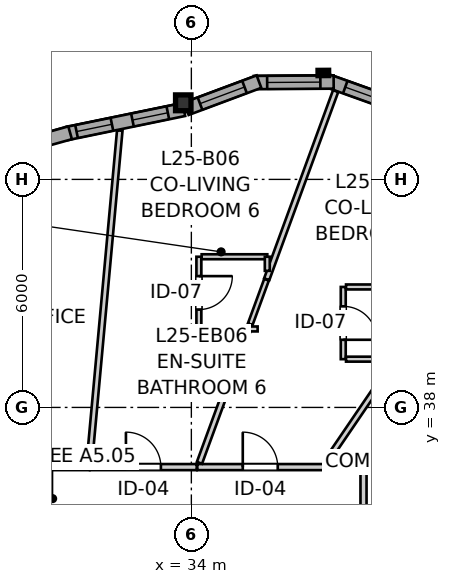
"""IFC4 building model, lengths in metres.
Left out: names, types, materials, properties, quantities, classifications, styles, units other than length and angle.
Written with IfcOpenShell. Run it as: python <this file> out.ifc"""

import sys

from ifc_helpers import new_model, si_unit, direction, frame, frame_2d, origin, origin_2d, place, context, subcontext, project, spatial, rectangle, i_section, extrude, source, transform, mapped, element, fill, save


model = new_model("IFC4")
c1 = context("Model", 3, precision=1e-05, world=origin(), true_north=direction((0.0, 1.0)))
c2 = subcontext(c1, "Body", "Model", "MODEL_VIEW")
j1 = project(units=[si_unit("LENGTHUNIT", "METRE"), si_unit("PLANEANGLEUNIT", "RADIAN")], contexts=[c1])
p1 = place(None, origin())
s1 = spatial("IfcSite", under=j1, at=p1, CompositionType="ELEMENT")
p2 = place(p1, origin())
s2 = spatial("IfcBuilding", under=s1, at=p2, CompositionType="ELEMENT")
p3 = place(p2, frame((0.0, 0.0, 86.4)))
s3 = spatial("IfcBuildingStorey", under=s2, at=p3, CompositionType="ELEMENT", Elevation=86.4)
m1 = source(origin(), c2, "Body", "SweptSolid", [
    extrude(i_section(OverallWidth=0.406, OverallDepth=0.416, WebThickness=0.027, FlangeThickness=0.044, FilletRadius=0.015, at=origin_2d()), origin(), (0.0, 0.0, 1.0), 2.95),
])
p4 = place(p3, frame((33.787, 46.015, 0.0), z_axis=(0.0, 0.0, 1.0), x_axis=(1.0, 0.0, 0.0)))
e1 = element("IfcColumn", 1, at=p4, inside=s3, PredefinedType="PILASTER", context=c2, shape_type="MappedRepresentation", body=[
    mapped(m1, transform((0.0, 0.0, 0.0), x_axis=(1.0, 0.0, 0.0), y_axis=(0.0, 1.0, 0.0), z_axis=(0.0, 0.0, 1.0), scale=1.0)),
])
p5 = place(p3, frame((39.586, 45.877, 0.0), z_axis=(0.0, 0.0, 1.0), x_axis=(-0.941473186867, 0.33708787936, 0.0)))
e2 = element("IfcWall", 2, at=p5, inside=s3, PredefinedType="SOLIDWALL", context=c2, shape_type="SweptSolid", body=[
    extrude(rectangle(XDim=2.099, YDim=0.35, at=frame_2d((1.049, 0.0))), origin(), (0.0, 0.0, 1.0), 2.48),
])
p6 = place(p5, frame((0.283, 0.0, 0.82)))
e3 = element("IfcOpeningElement", 3, at=p6, cuts=e2, PredefinedType="OPENING", context=c2, shape_type="SweptSolid", body=[
    extrude(rectangle(XDim=1.35, YDim=1.45, at=frame_2d((0.675, 0.725))), frame((0.0, 0.185, 0.0), z_axis=(0.0, -1.0, 0.0), x_axis=(1.0, 0.0, 0.0)), (0.0, 0.0, 1.0), 0.37),
])
p7 = place(p3, frame((37.744, 46.562, 0.0), z_axis=(0.0, 0.0, 1.0), x_axis=(-0.999976451414, -0.006862697526, 0.0)))
e4 = element("IfcWall", 4, at=p7, inside=s3, PredefinedType="SOLIDWALL", context=c2, shape_type="SweptSolid", body=[
    extrude(rectangle(XDim=2.099, YDim=0.35, at=frame_2d((1.049, 0.0))), origin(), (0.0, 0.0, 1.0), 2.48),
])
p8 = place(p7, frame((0.35, 0.0, 0.82)))
e5 = element("IfcOpeningElement", 5, at=p8, cuts=e4, PredefinedType="OPENING", context=c2, shape_type="SweptSolid", body=[
    extrude(rectangle(XDim=1.4, YDim=1.35, at=frame_2d((0.7, 0.675))), frame((0.0, 0.185, 0.0), z_axis=(0.0, -1.0, 0.0), x_axis=(1.0, 0.0, 0.0)), (0.0, 0.0, 1.0), 0.37),
])
p9 = place(p3, frame((35.779, 46.573, 0.0), z_axis=(0.0, 0.0, 1.0), x_axis=(-0.9368002254, -0.349864741994, 0.0)))
e6 = element("IfcWall", 6, at=p9, inside=s3, PredefinedType="SOLIDWALL", context=c2, shape_type="SweptSolid", body=[
    extrude(rectangle(XDim=2.041, YDim=0.35, at=frame_2d((1.021, 0.0))), origin(), (0.0, 0.0, 1.0), 2.48),
])
p10 = place(p9, frame((0.406, 0.0, 0.82)))
e7 = element("IfcOpeningElement", 7, at=p10, cuts=e6, PredefinedType="OPENING", context=c2, shape_type="SweptSolid", body=[
    extrude(rectangle(XDim=1.25, YDim=1.35, at=frame_2d((0.625, 0.675))), frame((0.0, 0.185, 0.0), z_axis=(0.0, -1.0, 0.0), x_axis=(1.0, 0.0, 0.0)), (0.0, 0.0, 1.0), 0.37),
])
p11 = place(p3, frame((33.803, 45.84, 0.0), z_axis=(0.0, 0.0, 1.0), x_axis=(-0.97943222174, -0.201773444777, 0.0)))
e8 = element("IfcWall", 8, at=p11, inside=s3, PredefinedType="SOLIDWALL", context=c2, shape_type="SweptSolid", body=[
    extrude(rectangle(XDim=3.144, YDim=0.35, at=frame_2d((1.572, 0.0))), origin(), (0.0, 0.0, 1.0), 2.48),
])
p12 = place(p11, frame((0.431, 0.0, 0.82)))
e9 = element("IfcOpeningElement", 9, at=p12, cuts=e8, PredefinedType="OPENING", context=c2, shape_type="SweptSolid", body=[
    extrude(rectangle(XDim=0.95, YDim=1.35, at=frame_2d((0.475, 0.675))), frame((0.0, 0.185, 0.0), z_axis=(0.0, -1.0, 0.0), x_axis=(1.0, 0.0, 0.0)), (0.0, 0.0, 1.0), 0.37),
])
p13 = place(p11, frame((1.933, 0.0, 0.82)))
e10 = element("IfcOpeningElement", 10, at=p13, cuts=e8, PredefinedType="OPENING", context=c2, shape_type="SweptSolid", body=[
    extrude(rectangle(XDim=0.95, YDim=1.35, at=frame_2d((0.475, 0.675))), frame((0.0, 0.185, 0.0), z_axis=(0.0, -1.0, 0.0), x_axis=(1.0, 0.0, 0.0)), (0.0, 0.0, 1.0), 0.37),
])
p14 = place(p3, frame((30.809, 45.227, 0.0), z_axis=(0.0, 0.0, 1.0), x_axis=(-0.963041637143, -0.269352566591, 0.0)))
e11 = element("IfcWall", 11, at=p14, inside=s3, PredefinedType="SOLIDWALL", context=c2, shape_type="SweptSolid", body=[
    extrude(rectangle(XDim=2.873, YDim=0.35, at=frame_2d((1.437, 0.0))), origin(), (0.0, 0.0, 1.0), 2.48),
])
p15 = place(p14, frame((0.717, 0.0, 0.82)))
e12 = element("IfcOpeningElement", 12, at=p15, cuts=e11, PredefinedType="OPENING", context=c2, shape_type="SweptSolid", body=[
    extrude(rectangle(XDim=1.45, YDim=1.25, at=frame_2d((0.725, 0.625))), frame((0.0, 0.185, 0.0), z_axis=(0.0, -1.0, 0.0), x_axis=(1.0, 0.0, 0.0)), (0.0, 0.0, 1.0), 0.37),
])
p16 = place(p3, frame((38.53, 36.43, 0.0), z_axis=(0.0, 0.0, 1.0), x_axis=(0.0, -1.0, 0.0)))
e13 = element("IfcWall", 13, at=p16, inside=s3, PredefinedType="PARTITIONING", context=c2, shape_type="SweptSolid", body=[
    extrude(rectangle(XDim=4.559, YDim=0.16, at=frame_2d((2.279, 0.0))), origin(), (0.0, 0.0, 1.0), 2.588),
])
p17 = place(p16, frame((1.646, 0.0, 0.0)))
e14 = element("IfcOpeningElement", 14, at=p17, cuts=e13, PredefinedType="OPENING", context=c2, shape_type="SweptSolid", body=[
    extrude(rectangle(XDim=1.3, YDim=2.1, at=frame_2d((0.65, 1.05))), frame((0.0, 0.09, 0.0), z_axis=(0.0, -1.0, 0.0), x_axis=(1.0, 0.0, 0.0)), (0.0, 0.0, 1.0), 0.18),
])
p18 = place(p3, frame((27.307, 36.43, 0.0), z_axis=(0.0, 0.0, 1.0), x_axis=(1.0, 0.0, 0.0)))
e15 = element("IfcWall", 15, at=p18, inside=s3, PredefinedType="PARTITIONING", context=c2, shape_type="SweptSolid", body=[
    extrude(rectangle(XDim=4.013, YDim=0.16, at=frame_2d((2.007, 0.0))), origin(), (0.0, 0.0, 1.0), 2.95),
])
p19 = place(p18, frame((1.503, 0.0, 0.0)))
e16 = element("IfcOpeningElement", 16, at=p19, cuts=e15, PredefinedType="OPENING", context=c2, shape_type="SweptSolid", body=[
    extrude(rectangle(XDim=0.96, YDim=2.1, at=frame_2d((0.48, 1.05))), frame((0.0, 0.09, 0.0), z_axis=(0.0, -1.0, 0.0), x_axis=(1.0, 0.0, 0.0)), (0.0, 0.0, 1.0), 0.18),
])
p20 = place(p3, frame((34.156, 36.43, 0.0), z_axis=(0.0, 0.0, 1.0), x_axis=(1.0, 0.0, 0.0)))
e17 = element("IfcWall", 17, at=p20, inside=s3, PredefinedType="PARTITIONING", context=c2, shape_type="SweptSolid", body=[
    extrude(rectangle(XDim=3.316, YDim=0.16, at=frame_2d((1.658, 0.0))), origin(), (0.0, 0.0, 1.0), 2.95),
])
p21 = place(p20, frame((1.197, 0.0, 0.0)))
e18 = element("IfcOpeningElement", 18, at=p21, cuts=e17, PredefinedType="OPENING", context=c2, shape_type="SweptSolid", body=[
    extrude(rectangle(XDim=0.92, YDim=2.1, at=frame_2d((0.46, 1.05))), frame((0.0, 0.09, 0.0), z_axis=(0.0, -1.0, 0.0), x_axis=(1.0, 0.0, 0.0)), (0.0, 0.0, 1.0), 0.18),
])
p22 = place(p3, frame((31.335, 36.43, 0.0), z_axis=(0.0, 0.0, 1.0), x_axis=(1.0, 0.0, 0.0)))
e19 = element("IfcWall", 19, at=p22, inside=s3, PredefinedType="PARTITIONING", context=c2, shape_type="SweptSolid", body=[
    extrude(rectangle(XDim=2.806, YDim=0.16, at=frame_2d((1.403, 0.0))), origin(), (0.0, 0.0, 1.0), 2.95),
])
p23 = place(p22, frame((0.944, 0.0, 0.0)))
e20 = element("IfcOpeningElement", 20, at=p23, cuts=e19, PredefinedType="OPENING", context=c2, shape_type="SweptSolid", body=[
    extrude(rectangle(XDim=0.92, YDim=2.1, at=frame_2d((0.46, 1.05))), frame((0.0, 0.09, 0.0), z_axis=(0.0, -1.0, 0.0), x_axis=(1.0, 0.0, 0.0)), (0.0, 0.0, 1.0), 0.18),
])
p24 = place(p3, frame((34.198, 41.965, 0.0), z_axis=(0.0, 0.0, 1.0), x_axis=(0.0, -1.0, 0.0)))
e21 = element("IfcWall", 21, at=p24, inside=s3, PredefinedType="PARTITIONING", context=c2, shape_type="SweptSolid", body=[
    extrude(rectangle(XDim=1.827, YDim=0.13, at=frame_2d((0.914, 0.0))), origin(), (0.0, 0.0, 1.0), 2.95),
])
p25 = place(p24, frame((0.51, 0.0, 0.0)))
e22 = element("IfcOpeningElement", 22, at=p25, cuts=e21, PredefinedType="OPENING", context=c2, shape_type="SweptSolid", body=[
    extrude(rectangle(XDim=0.88, YDim=2.05, at=frame_2d((0.44, 1.025))), frame((0.0, 0.075, 0.0), z_axis=(0.0, -1.0, 0.0), x_axis=(1.0, 0.0, 0.0)), (0.0, 0.0, 1.0), 0.15),
])
p26 = place(p3, frame((37.997, 41.17, 0.0), z_axis=(0.0, 0.0, 1.0), x_axis=(0.0, -1.0, 0.0)))
e23 = element("IfcWall", 23, at=p26, inside=s3, PredefinedType="PARTITIONING", context=c2, shape_type="SweptSolid", body=[
    extrude(rectangle(XDim=1.9, YDim=0.13, at=frame_2d((0.95, 0.0))), origin(), (0.0, 0.0, 1.0), 2.95),
])
p27 = place(p26, frame((0.51, 0.0, 0.0)))
e24 = element("IfcOpeningElement", 24, at=p27, cuts=e23, PredefinedType="OPENING", context=c2, shape_type="SweptSolid", body=[
    extrude(rectangle(XDim=0.88, YDim=2.05, at=frame_2d((0.44, 1.025))), frame((0.0, 0.075, 0.0), z_axis=(0.0, -1.0, 0.0), x_axis=(1.0, 0.0, 0.0)), (0.0, 0.0, 1.0), 0.15),
])
p28 = place(p3, frame((31.314, 36.525, 0.0), z_axis=(0.0, 0.0, 1.0), x_axis=(0.091226381691, 0.995830179942, 0.0)))
e25 = element("IfcWall", 25, at=p28, inside=s3, PredefinedType="PARTITIONING", context=c2, shape_type="SweptSolid", body=[
    extrude(rectangle(XDim=8.797, YDim=0.145, at=frame_2d((4.398, 0.0))), origin(), (0.0, 0.0, 1.0), 2.95),
])
p29 = place(p3, frame((38.659, 31.93, 0.0), z_axis=(0.0, 0.0, 1.0), x_axis=(0.813936175568, 0.580954302938, 0.0)))
e26 = element("IfcWall", 26, at=p29, inside=s3, PredefinedType="PARTITIONING", context=c2, shape_type="SweptSolid", body=[
    extrude(rectangle(XDim=6.346, YDim=0.145, at=frame_2d((3.173, 0.0))), origin(), (0.0, 0.0, 1.0), 2.95),
])
p30 = place(p3, frame((35.983, 41.373, 0.0), z_axis=(0.0, 0.0, 1.0), x_axis=(0.343972978133, 0.938979547335, 0.0)))
e27 = element("IfcWall", 27, at=p30, inside=s3, PredefinedType="PARTITIONING", context=c2, shape_type="SweptSolid", body=[
    extrude(rectangle(XDim=5.272, YDim=0.145, at=frame_2d((2.636, 0.0))), origin(), (0.0, 0.0, 1.0), 2.95),
])
p31 = place(p3, frame((34.213, 36.542, 0.0), z_axis=(0.0, 0.0, 1.0), x_axis=(0.343978558693, 0.93897750301, 0.0)))
e28 = element("IfcWall", 28, at=p31, inside=s3, PredefinedType="PARTITIONING", context=c2, shape_type="SweptSolid", body=[
    extrude(rectangle(XDim=3.664, YDim=0.145, at=frame_2d((1.832, 0.0))), origin(), (0.0, 0.0, 1.0), 2.95),
])
p32 = place(p3, frame((37.541, 36.557, 0.0), z_axis=(0.0, 0.0, 1.0), x_axis=(0.563020017907, 0.826443258449, 0.0)))
e29 = element("IfcWall", 29, at=p32, inside=s3, PredefinedType="PARTITIONING", context=c2, shape_type="SweptSolid", body=[
    extrude(rectangle(XDim=3.3, YDim=0.145, at=frame_2d((1.65, 0.0))), origin(), (0.0, 0.0, 1.0), 2.95),
])
p33 = place(p3, frame((38.07, 41.17, 0.0), z_axis=(0.0, 0.0, 1.0), x_axis=(1.0, 0.0, 0.0)))
e30 = element("IfcWall", 30, at=p33, inside=s3, PredefinedType="PARTITIONING", context=c2, shape_type="SweptSolid", body=[
    extrude(rectangle(XDim=1.727, YDim=0.13, at=frame_2d((0.864, 0.0))), origin(), (0.0, 0.0, 1.0), 2.95),
])
p34 = place(p3, frame((34.271, 41.965, 0.0), z_axis=(0.0, 0.0, 1.0), x_axis=(1.0, 0.0, 0.0)))
e31 = element("IfcWall", 31, at=p34, inside=s3, PredefinedType="PARTITIONING", context=c2, shape_type="SweptSolid", body=[
    extrude(rectangle(XDim=1.727, YDim=0.13, at=frame_2d((0.864, 0.0))), origin(), (0.0, 0.0, 1.0), 2.118),
])
p35 = place(p3, frame((38.07, 39.27, 0.0), z_axis=(0.0, 0.0, 1.0), x_axis=(1.0, 0.0, 0.0)))
e32 = element("IfcWall", 32, at=p35, inside=s3, PredefinedType="PARTITIONING", context=c2, shape_type="SweptSolid", body=[
    extrude(rectangle(XDim=1.179, YDim=0.13, at=frame_2d((0.589, 0.0))), origin(), (0.0, 0.0, 1.0), 2.95),
])
p36 = place(p3, frame((35.549, 40.189, 0.0), z_axis=(0.0, 0.0, 1.0), x_axis=(0.344070409158, 0.938943850048, 0.0)))
e33 = element("IfcWall", 33, at=p36, inside=s3, PredefinedType="PARTITIONING", context=c2, shape_type="SweptSolid", body=[
    extrude(rectangle(XDim=1.246, YDim=0.13, at=frame_2d((0.623, 0.0))), origin(), (0.0, 0.0, 1.0), 2.95),
])
p37 = place(p3, frame((33.958, 40.065, 0.0), z_axis=(0.0, 0.0, 1.0), x_axis=(1.0, 0.0, 0.0)))
e34 = element("IfcWall", 34, at=p37, inside=s3, PredefinedType="PARTITIONING", context=c2, shape_type="SweptSolid", body=[
    extrude(rectangle(XDim=1.786, YDim=0.13, at=frame_2d((0.893, 0.0))), origin(), (0.0, 0.0, 1.0), 2.95),
])
p38 = place(p3, frame((37.637, 36.43, 0.0), z_axis=(0.0, 0.0, 1.0), x_axis=(1.0, 0.0, 0.0)))
e35 = element("IfcWall", 35, at=p38, inside=s3, PredefinedType="PARTITIONING", context=c2, shape_type="SweptSolid", body=[
    extrude(rectangle(XDim=0.805, YDim=0.16, at=frame_2d((0.402, 0.0))), origin(), (0.0, 0.0, 1.0), 2.95),
])
p39 = place(p3, frame((35.998, 41.594, 0.0), z_axis=(0.0, 0.0, 1.0), x_axis=(0.0, 1.0, 0.0)))
e36 = element("IfcWall", 36, at=p39, inside=s3, PredefinedType="PARTITIONING", context=c2, shape_type="SweptSolid", body=[
    extrude(rectangle(XDim=0.371, YDim=0.13, at=frame_2d((0.186, 0.0))), origin(), (0.0, 0.0, 1.0), 2.95),
])
m2 = source(origin(), c2, "Body", "SweptSolid", [
    extrude(rectangle(XDim=1.35, YDim=1.45, at=frame_2d((0.675, 0.725))), frame((0.0, 0.03, 0.0), z_axis=(0.0, -1.0, 0.0), x_axis=(1.0, 0.0, 0.0)), (0.0, 0.0, 1.0), 0.06),
])
p40 = place(p6, origin())
e37 = element("IfcWindow", 37, at=p40, inside=s3, PartitioningType="SINGLE_PANEL", PredefinedType="WINDOW", context=c2, shape_type="MappedRepresentation", body=[
    mapped(m2, transform((0.0, 0.0, 0.0), x_axis=(1.0, 0.0, 0.0), y_axis=(0.0, 1.0, 0.0), z_axis=(0.0, 0.0, 1.0), scale=1.0)),
])
fill(e3, e37)
m3 = source(origin(), c2, "Body", "SweptSolid", [
    extrude(rectangle(XDim=1.4, YDim=1.35, at=frame_2d((0.7, 0.675))), frame((0.0, 0.03, 0.0), z_axis=(0.0, -1.0, 0.0), x_axis=(1.0, 0.0, 0.0)), (0.0, 0.0, 1.0), 0.06),
])
p41 = place(p8, origin())
e38 = element("IfcWindow", 38, at=p41, inside=s3, PartitioningType="SINGLE_PANEL", PredefinedType="WINDOW", context=c2, shape_type="MappedRepresentation", body=[
    mapped(m3, transform((0.0, 0.0, 0.0), x_axis=(1.0, 0.0, 0.0), y_axis=(0.0, 1.0, 0.0), z_axis=(0.0, 0.0, 1.0), scale=1.0)),
])
fill(e5, e38)
m4 = source(origin(), c2, "Body", "SweptSolid", [
    extrude(rectangle(XDim=1.25, YDim=1.35, at=frame_2d((0.625, 0.675))), frame((0.0, 0.03, 0.0), z_axis=(0.0, -1.0, 0.0), x_axis=(1.0, 0.0, 0.0)), (0.0, 0.0, 1.0), 0.06),
])
p42 = place(p10, origin())
e39 = element("IfcWindow", 39, at=p42, inside=s3, PartitioningType="SINGLE_PANEL", PredefinedType="WINDOW", context=c2, shape_type="MappedRepresentation", body=[
    mapped(m4, transform((0.0, 0.0, 0.0), x_axis=(1.0, 0.0, 0.0), y_axis=(0.0, 1.0, 0.0), z_axis=(0.0, 0.0, 1.0), scale=1.0)),
])
fill(e7, e39)
m5 = source(origin(), c2, "Body", "SweptSolid", [
    extrude(rectangle(XDim=0.95, YDim=1.35, at=frame_2d((0.475, 0.675))), frame((0.0, 0.03, 0.0), z_axis=(0.0, -1.0, 0.0), x_axis=(1.0, 0.0, 0.0)), (0.0, 0.0, 1.0), 0.06),
])
p43 = place(p12, origin())
e40 = element("IfcWindow", 40, at=p43, inside=s3, PartitioningType="SINGLE_PANEL", PredefinedType="WINDOW", context=c2, shape_type="MappedRepresentation", body=[
    mapped(m5, transform((0.0, 0.0, 0.0), x_axis=(1.0, 0.0, 0.0), y_axis=(0.0, 1.0, 0.0), z_axis=(0.0, 0.0, 1.0), scale=1.0)),
])
fill(e9, e40)
p44 = place(p13, origin())
e41 = element("IfcWindow", 41, at=p44, inside=s3, PartitioningType="SINGLE_PANEL", PredefinedType="WINDOW", context=c2, shape_type="MappedRepresentation", body=[
    mapped(m5, transform((0.0, 0.0, 0.0), x_axis=(1.0, 0.0, 0.0), y_axis=(0.0, 1.0, 0.0), z_axis=(0.0, 0.0, 1.0), scale=1.0)),
])
fill(e10, e41)
m6 = source(origin(), c2, "Body", "SweptSolid", [
    extrude(rectangle(XDim=0.92, YDim=2.1, at=frame_2d((0.46, 1.05))), frame((0.0, 0.025, 0.0), z_axis=(0.0, -1.0, 0.0), x_axis=(1.0, 0.0, 0.0)), (0.0, 0.0, 1.0), 0.05),
])
p45 = place(p21, origin())
e42 = element("IfcDoor", 42, at=p45, inside=s3, OperationType="SINGLE_SWING_LEFT", PredefinedType="DOOR", context=c2, shape_type="MappedRepresentation", body=[
    mapped(m6, transform((0.0, 0.0, 0.0), x_axis=(1.0, 0.0, 0.0), y_axis=(0.0, 1.0, 0.0), z_axis=(0.0, 0.0, 1.0), scale=1.0)),
])
fill(e18, e42)
p46 = place(p23, origin())
e43 = element("IfcDoor", 43, at=p46, inside=s3, OperationType="SINGLE_SWING_LEFT", PredefinedType="DOOR", context=c2, shape_type="MappedRepresentation", body=[
    mapped(m6, transform((0.0, 0.0, 0.0), x_axis=(1.0, 0.0, 0.0), y_axis=(0.0, 1.0, 0.0), z_axis=(0.0, 0.0, 1.0), scale=1.0)),
])
fill(e20, e43)
m7 = source(origin(), c2, "Body", "SweptSolid", [
    extrude(rectangle(XDim=0.88, YDim=2.05, at=frame_2d((0.44, 1.025))), frame((0.0, 0.025, 0.0), z_axis=(0.0, -1.0, 0.0), x_axis=(1.0, 0.0, 0.0)), (0.0, 0.0, 1.0), 0.05),
])
p47 = place(p25, origin())
e44 = element("IfcDoor", 44, at=p47, inside=s3, OperationType="SINGLE_SWING_LEFT", PredefinedType="DOOR", context=c2, shape_type="MappedRepresentation", body=[
    mapped(m7, transform((0.0, 0.0, 0.0), x_axis=(1.0, 0.0, 0.0), y_axis=(0.0, 1.0, 0.0), z_axis=(0.0, 0.0, 1.0), scale=1.0)),
])
fill(e22, e44)
p48 = place(p27, origin())
e45 = element("IfcDoor", 45, at=p48, inside=s3, OperationType="SINGLE_SWING_RIGHT", PredefinedType="DOOR", context=c2, shape_type="MappedRepresentation", body=[
    mapped(m7, transform((0.0, 0.0, 0.0), x_axis=(1.0, 0.0, 0.0), y_axis=(0.0, 1.0, 0.0), z_axis=(0.0, 0.0, 1.0), scale=1.0)),
])
fill(e24, e45)
save(model, sys.argv[1])
